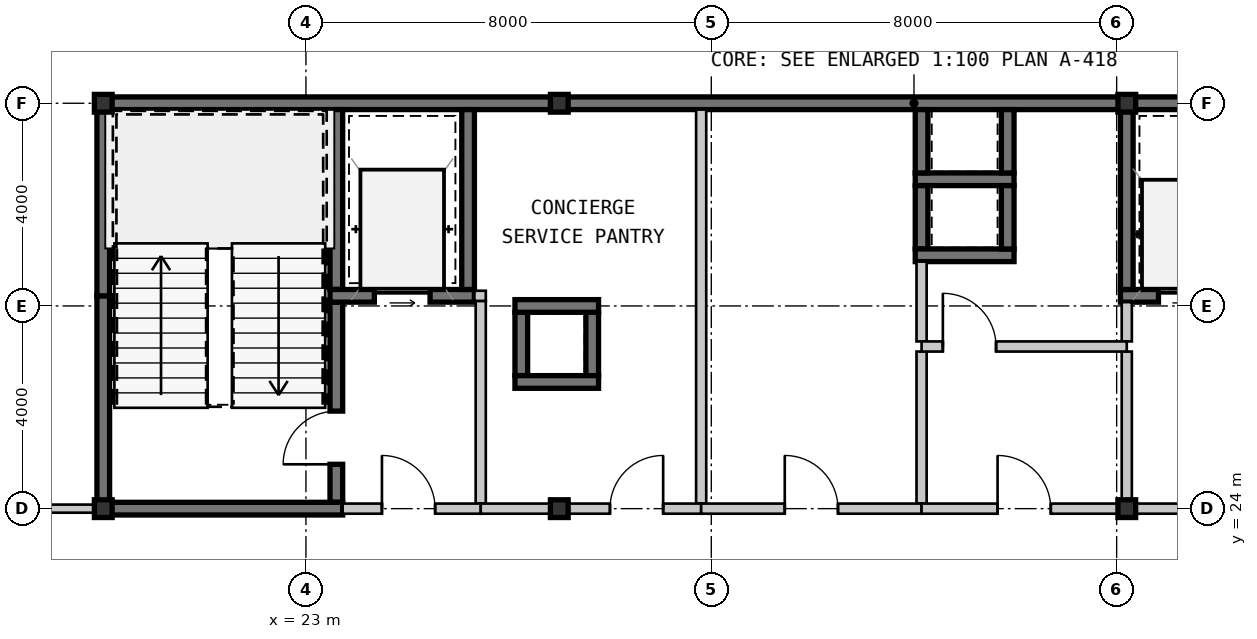
"""IFC4 building model, lengths in metres.
Left out: names, types, materials, properties, quantities, classifications, styles, units other than length and angle.
Written with IfcOpenShell. Run it as: python <this file> out.ifc"""

import sys

from ifc_helpers import new_model, si_unit, direction, frame, frame_2d, origin, origin_2d, place, context, subcontext, project, spatial, rectangle, hollow_rectangle, extrude, source, transform, mapped, element, fill, save


model = new_model("IFC4")
c1 = context("Model", 3, precision=1e-05, world=origin(), true_north=direction((0.0, 1.0)))
c2 = subcontext(c1, "Body", "Model", "MODEL_VIEW")
j1 = project(units=[si_unit("LENGTHUNIT", "METRE"), si_unit("PLANEANGLEUNIT", "RADIAN")], contexts=[c1])
p1 = place(None, origin())
s1 = spatial("IfcSite", under=j1, at=p1, CompositionType="ELEMENT")
p2 = place(p1, origin())
s2 = spatial("IfcBuilding", under=s1, at=p2, CompositionType="ELEMENT")
p3 = place(p2, frame((0.0, 0.0, 191.45)))
s3 = spatial("IfcBuildingStorey", under=s2, at=p3, CompositionType="ELEMENT", Elevation=191.45)
m1 = source(origin(), c2, "Body", "SweptSolid", [
    extrude(hollow_rectangle(XDim=0.35, YDim=0.35, WallThickness=0.016, at=origin_2d()), origin(), (0.0, 0.0, 1.0), 3.15),
])
for number, where, z_axis, x_axis in (
    (1, (19.0, 24.0, 0.0), (0.0, 0.0, 1.0), (1.0, 0.0, 0.0)),
    (2, (28.0, 24.0, 0.0), (0.0, 0.0, 1.0), (1.0, 0.0, 0.0)),
    (3, (39.2, 24.0, 0.0), (0.0, 0.0, 1.0), (1.0, 0.0, 0.0)),
    (4, (19.0, 32.0, 0.0), (0.0, 0.0, 1.0), (1.0, 0.0, 0.0)),
    (5, (28.0, 32.0, 0.0), (0.0, 0.0, 1.0), (1.0, 0.0, 0.0)),
    (6, (39.2, 32.0, 0.0), (0.0, 0.0, 1.0), (1.0, 0.0, 0.0)),
):
    element("IfcColumn", number, at=place(p3, frame(where, z_axis=z_axis, x_axis=x_axis)), inside=s3, PredefinedType="COLUMN", context=c2, shape_type="MappedRepresentation", body=[
        mapped(m1, transform((0.0, 0.0, 0.0), scale=1.0)),
    ])
m2 = source(origin(), c2, "Body", "SweptSolid", [
    extrude(rectangle(XDim=9.125, YDim=0.25, at=frame_2d((4.562, 0.0))), origin(), (0.0, 0.0, 1.0), 2.93),
])
p4 = place(p3, frame((18.875, 32.0, 0.0), z_axis=(0.0, 0.0, 1.0), x_axis=(1.0, 0.0, 0.0)))
e7 = element("IfcWall", 7, at=p4, inside=s3, PredefinedType="SHEAR", context=c2, shape_type="MappedRepresentation", body=[
    mapped(m2, transform((0.0, 0.0, 0.0), scale=1.0)),
])
m3 = source(origin(), c2, "Body", "SweptSolid", [
    extrude(rectangle(XDim=11.2, YDim=0.25, at=frame_2d((5.6, 0.0))), origin(), (0.0, 0.0, 1.0), 2.93),
])
p5 = place(p3, frame((28.0, 32.0, 0.0), z_axis=(0.0, 0.0, 1.0), x_axis=(1.0, 0.0, 0.0)))
e8 = element("IfcWall", 8, at=p5, inside=s3, PredefinedType="SHEAR", context=c2, shape_type="MappedRepresentation", body=[
    mapped(m3, transform((0.0, 0.0, 0.0), scale=1.0)),
])
m4 = source(origin(), c2, "Body", "SweptSolid", [
    extrude(rectangle(XDim=11.925, YDim=0.25, at=frame_2d((5.962, 0.0))), origin(), (0.0, 0.0, 1.0), 2.93),
])
p6 = place(p3, frame((39.2, 32.0, 0.0), z_axis=(0.0, 0.0, 1.0), x_axis=(1.0, 0.0, 0.0)))
e9 = element("IfcWall", 9, at=p6, inside=s3, PredefinedType="SHEAR", context=c2, shape_type="MappedRepresentation", body=[
    mapped(m4, transform((0.0, 0.0, 0.0), scale=1.0)),
])
m5 = source(origin(), c2, "Body", "SweptSolid", [
    extrude(rectangle(XDim=4.075, YDim=0.25, at=frame_2d((2.038, 0.0))), origin(), (0.0, 0.0, 1.0), 2.93),
])
p7 = place(p3, frame((19.0, 24.125, 0.0), z_axis=(0.0, 0.0, 1.0), x_axis=(0.0, 1.0, 0.0)))
e10 = element("IfcWall", 10, at=p7, inside=s3, PredefinedType="SHEAR", context=c2, shape_type="MappedRepresentation", body=[
    mapped(m5, transform((0.0, 0.0, 0.0), scale=1.0)),
])
m6 = source(origin(), c2, "Body", "SweptSolid", [
    extrude(rectangle(XDim=3.675, YDim=0.25, at=frame_2d((1.837, 0.0))), origin(), (0.0, 0.0, 1.0), 2.93),
])
p8 = place(p3, frame((19.0, 28.2, 0.0), z_axis=(0.0, 0.0, 1.0), x_axis=(0.0, 1.0, 0.0)))
e11 = element("IfcWall", 11, at=p8, inside=s3, PredefinedType="SHEAR", context=c2, shape_type="MappedRepresentation", body=[
    mapped(m6, transform((0.0, 0.0, 0.0), scale=1.0)),
])
m7 = source(origin(), c2, "Body", "SweptSolid", [
    extrude(rectangle(XDim=3.55, YDim=0.25, at=frame_2d((1.775, 0.0))), origin(), (0.0, 0.0, 1.0), 2.93),
])
p9 = place(p3, frame((23.6, 28.325, 0.0), z_axis=(0.0, 0.0, 1.0), x_axis=(0.0, 1.0, 0.0)))
e12 = element("IfcWall", 12, at=p9, inside=s3, PredefinedType="SHEAR", context=c2, shape_type="MappedRepresentation", body=[
    mapped(m7, transform((0.0, 0.0, 0.0), scale=1.0)),
])
m8 = source(origin(), c2, "Body", "SweptSolid", [
    extrude(rectangle(XDim=3.95, YDim=0.25, at=frame_2d((1.975, 0.0))), origin(), (0.0, 0.0, 1.0), 2.93),
])
p10 = place(p3, frame((23.6, 24.125, 0.0), z_axis=(0.0, 0.0, 1.0), x_axis=(0.0, 1.0, 0.0)))
e13 = element("IfcWall", 13, at=p10, inside=s3, PredefinedType="SHEAR", context=c2, shape_type="MappedRepresentation", body=[
    mapped(m8, transform((0.0, 0.0, 0.0), scale=1.0)),
])
m9 = source(origin(), c2, "Body", "SweptSolid", [
    extrude(rectangle(XDim=1.05, YDim=2.1, at=frame_2d((0.525, 1.05))), frame((0.0, 0.135, 0.0), z_axis=(0.0, -1.0, 0.0), x_axis=(1.0, 0.0, 0.0)), (0.0, 0.0, 1.0), 0.27),
])
p11 = place(p10, frame((0.75, 0.0, 0.0)))
e14 = element("IfcOpeningElement", 14, at=p11, cuts=e13, PredefinedType="OPENING", context=c2, shape_type="MappedRepresentation", body=[
    mapped(m9, transform((0.0, 0.0, 0.0), scale=1.0)),
])
m10 = source(origin(), c2, "Body", "SweptSolid", [
    extrude(rectangle(XDim=4.85, YDim=0.25, at=frame_2d((2.425, 0.0))), origin(), (0.0, 0.0, 1.0), 2.93),
])
p12 = place(p3, frame((18.875, 24.0, 0.0), z_axis=(0.0, 0.0, 1.0), x_axis=(1.0, 0.0, 0.0)))
e15 = element("IfcWall", 15, at=p12, inside=s3, PredefinedType="SHEAR", context=c2, shape_type="MappedRepresentation", body=[
    mapped(m10, transform((0.0, 0.0, 0.0), scale=1.0)),
])
m11 = source(origin(), c2, "Body", "SweptSolid", [
    extrude(rectangle(XDim=2.85, YDim=0.25, at=frame_2d((1.425, 0.0))), origin(), (0.0, 0.0, 1.0), 2.93),
])
p13 = place(p3, frame((23.475, 28.2, 0.0), z_axis=(0.0, 0.0, 1.0), x_axis=(1.0, 0.0, 0.0)))
e16 = element("IfcWall", 16, at=p13, inside=s3, PredefinedType="SHEAR", context=c2, shape_type="MappedRepresentation", body=[
    mapped(m11, transform((0.0, 0.0, 0.0), scale=1.0)),
])
m12 = source(origin(), c2, "Body", "SweptSolid", [
    extrude(rectangle(XDim=1.1, YDim=2.15, at=frame_2d((0.55, 1.075))), frame((0.0, 0.135, 0.0), z_axis=(0.0, -1.0, 0.0), x_axis=(1.0, 0.0, 0.0)), (0.0, 0.0, 1.0), 0.27),
])
p14 = place(p13, frame((0.875, 0.0, 0.0)))
e17 = element("IfcOpeningElement", 17, at=p14, cuts=e16, PredefinedType="OPENING", context=c2, shape_type="MappedRepresentation", body=[
    mapped(m12, transform((0.0, 0.0, 0.0), scale=1.0)),
])
p15 = place(p3, frame((26.2, 28.325, 0.0), z_axis=(0.0, 0.0, 1.0), x_axis=(0.0, 1.0, 0.0)))
e18 = element("IfcWall", 18, at=p15, inside=s3, PredefinedType="SHEAR", context=c2, shape_type="MappedRepresentation", body=[
    mapped(m7, transform((0.0, 0.0, 0.0), scale=1.0)),
])
m13 = source(origin(), c2, "Body", "SweptSolid", [
    extrude(rectangle(XDim=4.0, YDim=0.2, at=frame_2d((2.0, 0.0))), origin(), (0.0, 0.0, 1.0), 2.93),
])
p16 = place(p3, frame((26.45, 24.1, 0.0), z_axis=(0.0, 0.0, 1.0), x_axis=(0.0, 1.0, 0.0)))
e19 = element("IfcWall", 19, at=p16, inside=s3, PredefinedType="SOLIDWALL", context=c2, shape_type="MappedRepresentation", body=[
    mapped(m13, transform((0.0, 0.0, 0.0), scale=1.0)),
])
m14 = source(origin(), c2, "Body", "SweptSolid", [
    extrude(rectangle(XDim=2.725, YDim=0.2, at=frame_2d((1.362, 0.0))), origin(), (0.0, 0.0, 1.0), 2.47),
])
p17 = place(p3, frame((23.725, 24.0, 0.0), z_axis=(0.0, 0.0, 1.0), x_axis=(1.0, 0.0, 0.0)))
e20 = element("IfcWall", 20, at=p17, inside=s3, PredefinedType="SOLIDWALL", context=c2, shape_type="MappedRepresentation", body=[
    mapped(m14, transform((0.0, 0.0, 0.0), scale=1.0)),
])
m15 = source(origin(), c2, "Body", "SweptSolid", [
    extrude(rectangle(XDim=1.05, YDim=2.1, at=frame_2d((0.525, 1.05))), frame((0.0, 0.11, 0.0), z_axis=(0.0, -1.0, 0.0), x_axis=(1.0, 0.0, 0.0)), (0.0, 0.0, 1.0), 0.22),
])
p18 = place(p17, frame((0.775, 0.0, 0.0)))
e21 = element("IfcOpeningElement", 21, at=p18, cuts=e20, PredefinedType="OPENING", context=c2, shape_type="MappedRepresentation", body=[
    mapped(m15, transform((0.0, 0.0, 0.0), scale=1.0)),
])
m16 = source(origin(), c2, "Body", "SweptSolid", [
    extrude(rectangle(XDim=1.95, YDim=0.25, at=frame_2d((0.975, 0.0))), origin(), (0.0, 0.0, 1.0), 2.93),
])
p19 = place(p3, frame((35.025, 30.5, 0.0), z_axis=(0.0, 0.0, 1.0), x_axis=(1.0, 0.0, 0.0)))
e22 = element("IfcWall", 22, at=p19, inside=s3, PredefinedType="SHEAR", context=c2, shape_type="MappedRepresentation", body=[
    mapped(m16, transform((0.0, 0.0, 0.0), scale=1.0)),
])
m17 = source(origin(), c2, "Body", "SweptSolid", [
    extrude(rectangle(XDim=1.25, YDim=0.25, at=frame_2d((0.625, 0.0))), origin(), (0.0, 0.0, 1.0), 2.93),
])
for number, where, z_axis, x_axis in (
    (23, (35.15, 31.875, 0.0), (0.0, 0.0, 1.0), (0.0, -1.0, 0.0)),
    (24, (36.85, 30.625, 0.0), (0.0, 0.0, 1.0), (0.0, 1.0, 0.0)),
    (25, (35.15, 30.375, 0.0), (0.0, 0.0, 1.0), (0.0, -1.0, 0.0)),
):
    element("IfcWall", number, at=place(p3, frame(where, z_axis=z_axis, x_axis=x_axis)), inside=s3, PredefinedType="SHEAR", context=c2, shape_type="MappedRepresentation", body=[
        mapped(m17, transform((0.0, 0.0, 0.0), scale=1.0)),
    ])
p20 = place(p3, frame((35.025, 29.0, 0.0), z_axis=(0.0, 0.0, 1.0), x_axis=(1.0, 0.0, 0.0)))
e26 = element("IfcWall", 26, at=p20, inside=s3, PredefinedType="SHEAR", context=c2, shape_type="MappedRepresentation", body=[
    mapped(m16, transform((0.0, 0.0, 0.0), scale=1.0)),
])
for number, where, z_axis, x_axis in (
    (27, (36.85, 29.125, 0.0), (0.0, 0.0, 1.0), (0.0, 1.0, 0.0)),
    (28, (28.65, 26.625, 0.0), (0.0, 0.0, 1.0), (0.0, 1.0, 0.0)),
    (29, (27.25, 27.875, 0.0), (0.0, 0.0, 1.0), (0.0, -1.0, 0.0)),
):
    element("IfcWall", number, at=place(p3, frame(where, z_axis=z_axis, x_axis=x_axis)), inside=s3, PredefinedType="SHEAR", context=c2, shape_type="MappedRepresentation", body=[
        mapped(m17, transform((0.0, 0.0, 0.0), scale=1.0)),
    ])
m18 = source(origin(), c2, "Body", "SweptSolid", [
    extrude(rectangle(XDim=1.65, YDim=0.25, at=frame_2d((0.825, 0.0))), origin(), (0.0, 0.0, 1.0), 2.93),
])
for number, where, z_axis, x_axis in (
    (30, (28.775, 28.0, 0.0), (0.0, 0.0, 1.0), (-1.0, 0.0, 0.0)),
    (31, (27.125, 26.5, 0.0), (0.0, 0.0, 1.0), (1.0, 0.0, 0.0)),
):
    element("IfcWall", number, at=place(p3, frame(where, z_axis=z_axis, x_axis=x_axis)), inside=s3, PredefinedType="SHEAR", context=c2, shape_type="MappedRepresentation", body=[
        mapped(m18, transform((0.0, 0.0, 0.0), scale=1.0)),
    ])
m19 = source(origin(), c2, "Body", "SweptSolid", [
    extrude(rectangle(XDim=2.425, YDim=0.25, at=frame_2d((1.212, 0.0))), origin(), (0.0, 0.0, 1.0), 2.93),
])
p21 = place(p3, frame((39.075, 28.2, 0.0), z_axis=(0.0, 0.0, 1.0), x_axis=(1.0, 0.0, 0.0)))
e32 = element("IfcWall", 32, at=p21, inside=s3, PredefinedType="SHEAR", context=c2, shape_type="MappedRepresentation", body=[
    mapped(m19, transform((0.0, 0.0, 0.0), scale=1.0)),
])
m20 = source(origin(), c2, "Body", "SweptSolid", [
    extrude(rectangle(XDim=1.05, YDim=2.15, at=frame_2d((0.525, 1.075))), frame((0.0, 0.135, 0.0), z_axis=(0.0, -1.0, 0.0), x_axis=(1.0, 0.0, 0.0)), (0.0, 0.0, 1.0), 0.27),
])
p22 = place(p21, frame((0.75, 0.0, 0.0)))
e33 = element("IfcOpeningElement", 33, at=p22, cuts=e32, PredefinedType="OPENING", context=c2, shape_type="MappedRepresentation", body=[
    mapped(m20, transform((0.0, 0.0, 0.0), scale=1.0)),
])
p23 = place(p3, frame((39.2, 31.875, 0.0), z_axis=(0.0, 0.0, 1.0), x_axis=(0.0, -1.0, 0.0)))
e34 = element("IfcWall", 34, at=p23, inside=s3, PredefinedType="SHEAR", context=c2, shape_type="MappedRepresentation", body=[
    mapped(m7, transform((0.0, 0.0, 0.0), scale=1.0)),
])
m21 = source(origin(), c2, "Body", "SweptSolid", [
    extrude(rectangle(XDim=3.0, YDim=0.2, at=frame_2d((1.5, 0.0))), origin(), (0.0, 0.0, 1.0), 2.47),
])
p24 = place(p3, frame((39.2, 24.1, 0.0), z_axis=(0.0, 0.0, 1.0), x_axis=(0.0, 1.0, 0.0)))
e35 = element("IfcWall", 35, at=p24, inside=s3, PredefinedType="SOLIDWALL", context=c2, shape_type="MappedRepresentation", body=[
    mapped(m21, transform((0.0, 0.0, 0.0), scale=1.0)),
])
m22 = source(origin(), c2, "Body", "SweptSolid", [
    extrude(rectangle(XDim=0.775, YDim=0.2, at=frame_2d((0.387, 0.0))), origin(), (0.0, 0.0, 1.0), 2.47),
])
p25 = place(p3, frame((39.2, 27.3, 0.0), z_axis=(0.0, 0.0, 1.0), x_axis=(0.0, 1.0, 0.0)))
e36 = element("IfcWall", 36, at=p25, inside=s3, PredefinedType="SOLIDWALL", context=c2, shape_type="MappedRepresentation", body=[
    mapped(m22, transform((0.0, 0.0, 0.0), scale=1.0)),
])
m23 = source(origin(), c2, "Body", "SweptSolid", [
    extrude(rectangle(XDim=4.35, YDim=0.2, at=frame_2d((2.175, 0.0))), origin(), (0.0, 0.0, 1.0), 2.397),
])
p26 = place(p3, frame((43.55, 24.0, 0.0), z_axis=(0.0, 0.0, 1.0), x_axis=(-1.0, 0.0, 0.0)))
e37 = element("IfcWall", 37, at=p26, inside=s3, PredefinedType="SOLIDWALL", context=c2, shape_type="MappedRepresentation", body=[
    mapped(m23, transform((0.0, 0.0, 0.0), scale=1.0)),
])
p27 = place(p26, frame((1.65, 0.0, 0.0)))
e38 = element("IfcOpeningElement", 38, at=p27, cuts=e37, PredefinedType="OPENING", context=c2, shape_type="MappedRepresentation", body=[
    mapped(m15, transform((0.0, 0.0, 0.0), scale=1.0)),
])
m24 = source(origin(), c2, "Body", "SweptSolid", [
    extrude(rectangle(XDim=7.775, YDim=0.2, at=frame_2d((3.887, 0.0))), origin(), (0.0, 0.0, 1.0), 2.93),
])
p28 = place(p3, frame((30.8, 31.875, 0.0), z_axis=(0.0, 0.0, 1.0), x_axis=(0.0, -1.0, 0.0)))
e39 = element("IfcWall", 39, at=p28, inside=s3, PredefinedType="SOLIDWALL", context=c2, shape_type="MappedRepresentation", body=[
    mapped(m24, transform((0.0, 0.0, 0.0), scale=1.0)),
])
m25 = source(origin(), c2, "Body", "SweptSolid", [
    extrude(rectangle(XDim=4.35, YDim=0.2, at=frame_2d((2.175, 0.0))), origin(), (0.0, 0.0, 1.0), 2.47),
])
p29 = place(p3, frame((30.8, 24.0, 0.0), z_axis=(0.0, 0.0, 1.0), x_axis=(-1.0, 0.0, 0.0)))
e40 = element("IfcWall", 40, at=p29, inside=s3, PredefinedType="SOLIDWALL", context=c2, shape_type="MappedRepresentation", body=[
    mapped(m25, transform((0.0, 0.0, 0.0), scale=1.0)),
])
p30 = place(p29, frame((0.75, 0.0, 0.0)))
e41 = element("IfcOpeningElement", 41, at=p30, cuts=e40, PredefinedType="OPENING", context=c2, shape_type="MappedRepresentation", body=[
    mapped(m15, transform((0.0, 0.0, 0.0), scale=1.0)),
])
m26 = source(origin(), c2, "Body", "SweptSolid", [
    extrude(rectangle(XDim=3.0, YDim=0.2, at=frame_2d((1.5, 0.0))), origin(), (0.0, 0.0, 1.0), 2.93),
])
p31 = place(p3, frame((35.15, 27.1, 0.0), z_axis=(0.0, 0.0, 1.0), x_axis=(0.0, -1.0, 0.0)))
e42 = element("IfcWall", 42, at=p31, inside=s3, PredefinedType="SOLIDWALL", context=c2, shape_type="MappedRepresentation", body=[
    mapped(m26, transform((0.0, 0.0, 0.0), scale=1.0)),
])
m27 = source(origin(), c2, "Body", "SweptSolid", [
    extrude(rectangle(XDim=1.575, YDim=0.2, at=frame_2d((0.788, 0.0))), origin(), (0.0, 0.0, 1.0), 2.93),
])
p32 = place(p3, frame((35.15, 28.875, 0.0), z_axis=(0.0, 0.0, 1.0), x_axis=(0.0, -1.0, 0.0)))
e43 = element("IfcWall", 43, at=p32, inside=s3, PredefinedType="SOLIDWALL", context=c2, shape_type="MappedRepresentation", body=[
    mapped(m27, transform((0.0, 0.0, 0.0), scale=1.0)),
])
m28 = source(origin(), c2, "Body", "SweptSolid", [
    extrude(rectangle(XDim=4.35, YDim=0.2, at=frame_2d((2.175, 0.0))), origin(), (0.0, 0.0, 1.0), 2.47),
])
p33 = place(p3, frame((35.15, 24.0, 0.0), z_axis=(0.0, 0.0, 1.0), x_axis=(-1.0, 0.0, 0.0)))
e44 = element("IfcWall", 44, at=p33, inside=s3, PredefinedType="SOLIDWALL", context=c2, shape_type="MappedRepresentation", body=[
    mapped(m28, transform((0.0, 0.0, 0.0), scale=1.0)),
])
p34 = place(p33, frame((1.65, 0.0, 0.0)))
e45 = element("IfcOpeningElement", 45, at=p34, cuts=e44, PredefinedType="OPENING", context=c2, shape_type="MappedRepresentation", body=[
    mapped(m15, transform((0.0, 0.0, 0.0), scale=1.0)),
])
m29 = source(origin(), c2, "Body", "SweptSolid", [
    extrude(rectangle(XDim=4.05, YDim=0.2, at=frame_2d((2.025, 0.0))), origin(), (0.0, 0.0, 1.0), 2.93),
])
p35 = place(p3, frame((35.15, 27.2, 0.0), z_axis=(0.0, 0.0, 1.0), x_axis=(1.0, 0.0, 0.0)))
e46 = element("IfcWall", 46, at=p35, inside=s3, PredefinedType="SOLIDWALL", context=c2, shape_type="MappedRepresentation", body=[
    mapped(m29, transform((0.0, 0.0, 0.0), scale=1.0)),
])
p36 = place(p35, frame((0.42, 0.0, 0.0)))
e47 = element("IfcOpeningElement", 47, at=p36, cuts=e46, PredefinedType="OPENING", context=c2, shape_type="MappedRepresentation", body=[
    mapped(m15, transform((0.0, 0.0, 0.0), scale=1.0)),
])
m30 = source(origin(), c2, "Body", "SweptSolid", [
    extrude(rectangle(XDim=4.05, YDim=0.2, at=frame_2d((2.025, 0.0))), origin(), (0.0, 0.0, 1.0), 2.47),
])
p37 = place(p3, frame((39.2, 24.0, 0.0), z_axis=(0.0, 0.0, 1.0), x_axis=(-1.0, 0.0, 0.0)))
e48 = element("IfcWall", 48, at=p37, inside=s3, PredefinedType="SOLIDWALL", context=c2, shape_type="MappedRepresentation", body=[
    mapped(m30, transform((0.0, 0.0, 0.0), scale=1.0)),
])
p38 = place(p37, frame((1.5, 0.0, 0.0)))
e49 = element("IfcOpeningElement", 49, at=p38, cuts=e48, PredefinedType="OPENING", context=c2, shape_type="MappedRepresentation", body=[
    mapped(m15, transform((0.0, 0.0, 0.0), scale=1.0)),
])
m31 = source(origin(), c2, "Body", "SweptSolid", [
    extrude(rectangle(XDim=6.251, YDim=0.16, at=frame_2d((3.125, 0.0))), origin(), (0.0, 0.0, 1.0), 2.93),
])
p39 = place(p3, frame((12.624, 24.0, 0.0), z_axis=(0.0, 0.0, 1.0), x_axis=(1.0, 0.0, 0.0)))
e50 = element("IfcWall", 50, at=p39, inside=s3, PredefinedType="PARTITIONING", context=c2, shape_type="MappedRepresentation", body=[
    mapped(m31, transform((0.0, 0.0, 0.0), scale=1.0)),
])
m32 = source(origin(), c2, "Body", "SweptSolid", [
    extrude(rectangle(XDim=0.92, YDim=2.1, at=frame_2d((0.46, 1.05))), frame((0.0, 0.09, 0.0), z_axis=(0.0, -1.0, 0.0), x_axis=(1.0, 0.0, 0.0)), (0.0, 0.0, 1.0), 0.18),
])
p40 = place(p39, frame((2.718, 0.0, 0.0)))
e51 = element("IfcOpeningElement", 51, at=p40, cuts=e50, PredefinedType="OPENING", context=c2, shape_type="MappedRepresentation", body=[
    mapped(m32, transform((0.0, 0.0, 0.0), scale=1.0)),
])
m33 = source(origin(), c2, "Body", "SweptSolid", [
    extrude(rectangle(XDim=0.225, YDim=0.2, at=frame_2d((0.113, 0.0))), origin(), (0.0, 0.0, 1.0), 2.93),
])
p41 = place(p3, frame((26.325, 28.2, 0.0), z_axis=(0.0, 0.0, 1.0), x_axis=(1.0, 0.0, 0.0)))
e52 = element("IfcWall", 52, at=p41, inside=s3, PredefinedType="SOLIDWALL", context=c2, shape_type="MappedRepresentation", body=[
    mapped(m33, transform((0.0, 0.0, 0.0), scale=1.0)),
])
m34 = source(origin(), c2, "Body", "SweptSolid", [
    extrude(rectangle(XDim=1.05, YDim=2.1, at=frame_2d((0.525, 1.05))), frame((0.0, 0.025, 0.0), z_axis=(0.0, -1.0, 0.0), x_axis=(1.0, 0.0, 0.0)), (0.0, 0.0, 1.0), 0.05),
])
p42 = place(p11, origin())
e53 = element("IfcDoor", 53, at=p42, inside=s3, OperationType="SINGLE_SWING_LEFT", PredefinedType="DOOR", context=c2, shape_type="MappedRepresentation", body=[
    mapped(m34, transform((0.0, 0.0, 0.0), scale=1.0)),
])
fill(e14, e53)
m35 = source(origin(), c2, "Body", "SweptSolid", [
    extrude(rectangle(XDim=1.1, YDim=2.15, at=frame_2d((0.55, 1.075))), frame((0.0, 0.025, 0.0), z_axis=(0.0, -1.0, 0.0), x_axis=(1.0, 0.0, 0.0)), (0.0, 0.0, 1.0), 0.05),
])
p43 = place(p14, origin())
e54 = element("IfcDoor", 54, at=p43, inside=s3, OperationType="SLIDING_TO_LEFT", PredefinedType="DOOR", context=c2, shape_type="MappedRepresentation", body=[
    mapped(m35, transform((0.0, 0.0, 0.0), scale=1.0)),
])
fill(e17, e54)
p44 = place(p18, origin())
e55 = element("IfcDoor", 55, at=p44, inside=s3, OperationType="SINGLE_SWING_LEFT", PredefinedType="DOOR", context=c2, shape_type="MappedRepresentation", body=[
    mapped(m34, transform((0.0, 0.0, 0.0), scale=1.0)),
])
fill(e21, e55)
m36 = source(origin(), c2, "Body", "SweptSolid", [
    extrude(rectangle(XDim=1.05, YDim=2.15, at=frame_2d((0.525, 1.075))), frame((0.0, 0.025, 0.0), z_axis=(0.0, -1.0, 0.0), x_axis=(1.0, 0.0, 0.0)), (0.0, 0.0, 1.0), 0.05),
])
p45 = place(p22, origin())
e56 = element("IfcDoor", 56, at=p45, inside=s3, OperationType="SLIDING_TO_LEFT", PredefinedType="DOOR", context=c2, shape_type="MappedRepresentation", body=[
    mapped(m36, transform((0.0, 0.0, 0.0), scale=1.0)),
])
fill(e33, e56)
p46 = place(p30, frame((1.05, 0.0, 0.0), z_axis=(0.0, 0.0, 1.0), x_axis=(-1.0, 0.0, 0.0)))
e57 = element("IfcDoor", 57, at=p46, inside=s3, OperationType="SINGLE_SWING_RIGHT", PredefinedType="DOOR", context=c2, shape_type="MappedRepresentation", body=[
    mapped(m34, transform((0.0, 0.0, 0.0), scale=1.0)),
])
fill(e41, e57)
p47 = place(p34, frame((1.05, 0.0, 0.0), z_axis=(0.0, 0.0, 1.0), x_axis=(-1.0, 0.0, 0.0)))
e58 = element("IfcDoor", 58, at=p47, inside=s3, OperationType="SINGLE_SWING_LEFT", PredefinedType="DOOR", context=c2, shape_type="MappedRepresentation", body=[
    mapped(m34, transform((0.0, 0.0, 0.0), scale=1.0)),
])
fill(e45, e58)
p48 = place(p36, origin())
e59 = element("IfcDoor", 59, at=p48, inside=s3, OperationType="SINGLE_SWING_LEFT", PredefinedType="DOOR", context=c2, shape_type="MappedRepresentation", body=[
    mapped(m34, transform((0.0, 0.0, 0.0), scale=1.0)),
])
fill(e47, e59)
p49 = place(p38, frame((1.05, 0.0, 0.0), z_axis=(0.0, 0.0, 1.0), x_axis=(-1.0, 0.0, 0.0)))
e60 = element("IfcDoor", 60, at=p49, inside=s3, OperationType="SINGLE_SWING_LEFT", PredefinedType="DOOR", context=c2, shape_type="MappedRepresentation", body=[
    mapped(m34, transform((0.0, 0.0, 0.0), scale=1.0)),
])
fill(e49, e60)
save(model, sys.argv[1])
